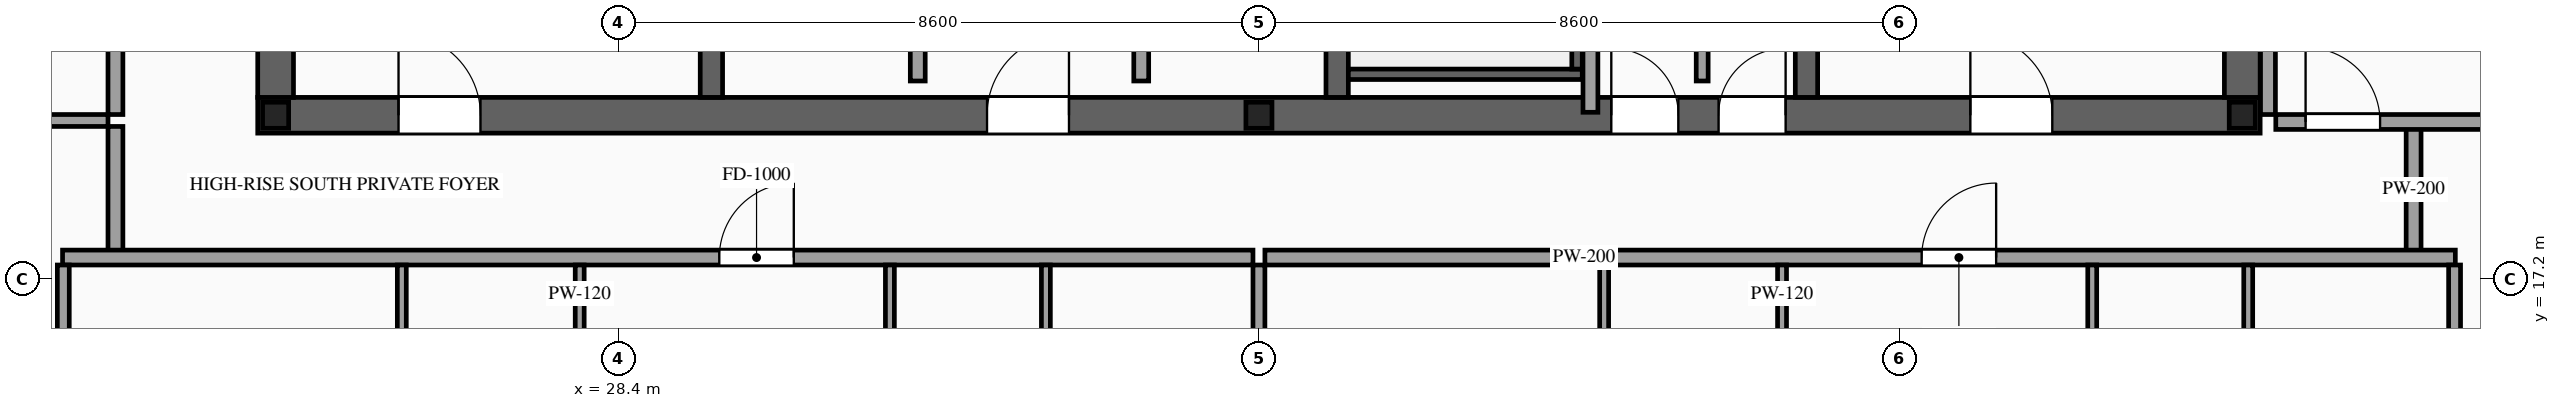
"""IFC4 building model, lengths in metres.
Left out: names, types, materials, properties, quantities, classifications, styles, units other than length and angle.
Written with IfcOpenShell. Run it as: python <this file> out.ifc"""

import sys

from ifc_helpers import new_model, si_unit, direction, frame, frame_2d, origin, origin_2d, place, context, subcontext, project, spatial, rectangle, i_section, extrude, source, transform, mapped, element, fill, save


model = new_model("IFC4")
c1 = context("Model", 3, precision=1e-05, world=origin(), true_north=direction((0.0, 1.0)))
c2 = subcontext(c1, "Body", "Model", "MODEL_VIEW")
j1 = project(units=[si_unit("LENGTHUNIT", "METRE"), si_unit("PLANEANGLEUNIT", "RADIAN")], contexts=[c1])
p1 = place(None, origin())
s1 = spatial("IfcSite", under=j1, at=p1, CompositionType="ELEMENT")
p2 = place(p1, origin())
s2 = spatial("IfcBuilding", under=s1, at=p2, CompositionType="ELEMENT")
p3 = place(p2, frame((0.0, 0.0, 321.7)))
s3 = spatial("IfcBuildingStorey", under=s2, at=p3, CompositionType="ELEMENT", Elevation=321.7)
p4 = place(p3, frame((23.56, 19.4, 0.0), z_axis=(0.0, 0.0, 1.0), x_axis=(1.0, 0.0, 0.0)))
e1 = element("IfcWall", 1, at=p4, inside=s3, PredefinedType="SHEAR", context=c2, shape_type="SweptSolid", body=[
    extrude(rectangle(XDim=26.88, YDim=0.48, at=frame_2d((13.44, 0.0))), origin(), (0.0, 0.0, 1.0), 3.5),
])
p5 = place(p4, frame((1.89, 0.0, 0.0)))
e2 = element("IfcOpeningElement", 2, at=p5, cuts=e1, PredefinedType="OPENING", context=c2, shape_type="SweptSolid", body=[
    extrude(rectangle(XDim=1.1, YDim=2.2, at=frame_2d((0.55, 1.1))), frame((0.0, 0.255, 0.0), z_axis=(0.0, -1.0, 0.0), x_axis=(1.0, 0.0, 0.0)), (0.0, 0.0, 1.0), 0.51),
])
p6 = place(p4, frame((9.79, 0.0, 0.0)))
e3 = element("IfcOpeningElement", 3, at=p6, cuts=e1, PredefinedType="OPENING", context=c2, shape_type="SweptSolid", body=[
    extrude(rectangle(XDim=1.1, YDim=2.2, at=frame_2d((0.55, 1.1))), frame((0.0, 0.255, 0.0), z_axis=(0.0, -1.0, 0.0), x_axis=(1.0, 0.0, 0.0)), (0.0, 0.0, 1.0), 0.51),
])
p7 = place(p4, frame((22.99, 0.0, 0.0)))
e4 = element("IfcOpeningElement", 4, at=p7, cuts=e1, PredefinedType="OPENING", context=c2, shape_type="SweptSolid", body=[
    extrude(rectangle(XDim=1.1, YDim=2.2, at=frame_2d((0.55, 1.1))), frame((0.0, 0.255, 0.0), z_axis=(0.0, -1.0, 0.0), x_axis=(1.0, 0.0, 0.0)), (0.0, 0.0, 1.0), 0.51),
])
p8 = place(p4, frame((19.61, 0.0, 0.0)))
e5 = element("IfcOpeningElement", 5, at=p8, cuts=e1, PredefinedType="OPENING", context=c2, shape_type="SweptSolid", body=[
    extrude(rectangle(XDim=0.9, YDim=2.15, at=frame_2d((0.45, 1.075))), frame((0.0, 0.255, 0.0), z_axis=(0.0, -1.0, 0.0), x_axis=(1.0, 0.0, 0.0)), (0.0, 0.0, 1.0), 0.51),
])
p9 = place(p4, frame((18.17, 0.0, 0.0)))
e6 = element("IfcOpeningElement", 6, at=p9, cuts=e1, PredefinedType="OPENING", context=c2, shape_type="SweptSolid", body=[
    extrude(rectangle(XDim=0.9, YDim=2.15, at=frame_2d((0.45, 1.075))), frame((0.0, 0.255, 0.0), z_axis=(0.0, -1.0, 0.0), x_axis=(1.0, 0.0, 0.0)), (0.0, 0.0, 1.0), 0.51),
])
m1 = source(origin(), c2, "Body", "SweptSolid", [
    extrude(rectangle(XDim=12.32, YDim=0.48, at=frame_2d((6.16, 0.0))), origin(), (0.0, 0.0, 1.0), 3.5),
])
for number, where, z_axis, x_axis in (
    (7, (23.8, 19.64, 0.0), (0.0, 0.0, 1.0), (0.0, 1.0, 0.0)),
    (8, (50.2, 19.64, 0.0), (0.0, 0.0, 1.0), (0.0, 1.0, 0.0)),
):
    element("IfcWall", number, at=place(p3, frame(where, z_axis=z_axis, x_axis=x_axis)), inside=s3, PredefinedType="SHEAR", context=c2, shape_type="MappedRepresentation", body=[
        mapped(m1, transform((0.0, 0.0, 0.0), scale=1.0)),
    ])
m2 = source(origin(), c2, "Body", "SweptSolid", [
    extrude(rectangle(XDim=12.32, YDim=0.3, at=frame_2d((6.16, 0.0))), origin(), (0.0, 0.0, 1.0), 3.5),
])
for number, where, z_axis, x_axis in (
    (9, (29.65, 19.64, 0.0), (0.0, 0.0, 1.0), (0.0, 1.0, 0.0)),
    (10, (38.05, 19.64, 0.0), (0.0, 0.0, 1.0), (0.0, 1.0, 0.0)),
):
    element("IfcWall", number, at=place(p3, frame(where, z_axis=z_axis, x_axis=x_axis)), inside=s3, PredefinedType="SOLIDWALL", context=c2, shape_type="MappedRepresentation", body=[
        mapped(m2, transform((0.0, 0.0, 0.0), scale=1.0)),
    ])
p10 = place(p3, frame((44.35, 19.64, 0.0), z_axis=(0.0, 0.0, 1.0), x_axis=(0.0, 1.0, 0.0)))
e11 = element("IfcWall", 11, at=p10, inside=s3, PredefinedType="SOLIDWALL", context=c2, shape_type="SweptSolid", body=[
    extrude(rectangle(XDim=12.32, YDim=0.3, at=frame_2d((6.16, 0.0))), origin(), (0.0, 0.0, 1.0), 3.5),
])
p11 = place(p10, frame((6.56, 0.0, 0.0)))
e12 = element("IfcOpeningElement", 12, at=p11, cuts=e11, PredefinedType="OPENING", context=c2, shape_type="SweptSolid", body=[
    extrude(rectangle(XDim=1.1, YDim=2.2, at=frame_2d((0.55, 1.1))), frame((0.0, 0.165, 0.0), z_axis=(0.0, -1.0, 0.0), x_axis=(1.0, 0.0, 0.0)), (0.0, 0.0, 1.0), 0.33),
])
p12 = place(p10, frame((8.66, 0.0, 0.0)))
e13 = element("IfcOpeningElement", 13, at=p12, cuts=e11, PredefinedType="OPENING", context=c2, shape_type="SweptSolid", body=[
    extrude(rectangle(XDim=1.1, YDim=2.2, at=frame_2d((0.55, 1.1))), frame((0.0, 0.165, 0.0), z_axis=(0.0, -1.0, 0.0), x_axis=(1.0, 0.0, 0.0)), (0.0, 0.0, 1.0), 0.33),
])
p13 = place(p10, frame((10.76, 0.0, 0.0)))
e14 = element("IfcOpeningElement", 14, at=p13, cuts=e11, PredefinedType="OPENING", context=c2, shape_type="SweptSolid", body=[
    extrude(rectangle(XDim=1.1, YDim=2.2, at=frame_2d((0.55, 1.1))), frame((0.0, 0.165, 0.0), z_axis=(0.0, -1.0, 0.0), x_axis=(1.0, 0.0, 0.0)), (0.0, 0.0, 1.0), 0.33),
])
m3 = source(origin(), c2, "Body", "SweptSolid", [
    extrude(i_section(OverallWidth=0.35, OverallDepth=0.35, WebThickness=0.012, FlangeThickness=0.019, at=origin_2d()), origin(), (0.0, 0.0, 1.0), 3.5),
])
for number, where, z_axis, x_axis in (
    (15, (23.8, 19.4, 0.0), (0.0, 0.0, 1.0), (1.0, 0.0, 0.0)),
    (16, (37.0, 19.4, 0.0), (0.0, 0.0, 1.0), (1.0, 0.0, 0.0)),
    (17, (50.2, 19.4, 0.0), (0.0, 0.0, 1.0), (1.0, 0.0, 0.0)),
):
    element("IfcColumn", number, at=place(p3, frame(where, z_axis=z_axis, x_axis=x_axis)), inside=s3, PredefinedType="COLUMN", context=c2, shape_type="MappedRepresentation", body=[
        mapped(m3, transform((0.0, 0.0, 0.0), scale=1.0)),
    ])
m4 = source(origin(), c2, "Body", "SweptSolid", [
    extrude(rectangle(XDim=3.14, YDim=0.14, at=frame_2d((1.57, 0.0))), origin(), (0.0, 0.0, 1.0), 3.28),
])
p14 = place(p3, frame((38.2, 19.95, 0.0), z_axis=(0.0, 0.0, 1.0), x_axis=(1.0, 0.0, 0.0)))
e18 = element("IfcWall", 18, at=p14, inside=s3, PredefinedType="SOLIDWALL", context=c2, shape_type="MappedRepresentation", body=[
    mapped(m4, transform((0.0, 0.0, 0.0), scale=1.0)),
])
m5 = source(origin(), c2, "Body", "SweptSolid", [
    extrude(rectangle(XDim=8.94, YDim=0.14, at=frame_2d((4.47, 0.0))), origin(), (0.0, 0.0, 1.0), 3.28),
])
p15 = place(p3, frame((41.27, 20.02, 0.0), z_axis=(0.0, 0.0, 1.0), x_axis=(0.0, 1.0, 0.0)))
e19 = element("IfcWall", 19, at=p15, inside=s3, PredefinedType="SOLIDWALL", context=c2, shape_type="MappedRepresentation", body=[
    mapped(m5, transform((0.0, 0.0, 0.0), scale=1.0)),
])
p16 = place(p3, frame((32.42, 19.86, 0.0), z_axis=(0.0, 0.0, 1.0), x_axis=(0.0, 1.0, 0.0)))
e20 = element("IfcWall", 20, at=p16, inside=s3, PredefinedType="PARTITIONING", context=c2, shape_type="SweptSolid", body=[
    extrude(rectangle(XDim=11.88, YDim=0.2, at=frame_2d((5.94, 0.0))), origin(), (0.0, 0.0, 1.0), 3.28),
])
p17 = place(p16, frame((5.49, 0.0, 0.0)))
e21 = element("IfcOpeningElement", 21, at=p17, cuts=e20, PredefinedType="OPENING", context=c2, shape_type="SweptSolid", body=[
    extrude(rectangle(XDim=0.9, YDim=2.15, at=frame_2d((0.45, 1.075))), frame((0.0, 0.115, 0.0), z_axis=(0.0, -1.0, 0.0), x_axis=(1.0, 0.0, 0.0)), (0.0, 0.0, 1.0), 0.23),
])
p18 = place(p3, frame((35.42, 19.86, 0.0), z_axis=(0.0, 0.0, 1.0), x_axis=(0.0, 1.0, 0.0)))
e22 = element("IfcWall", 22, at=p18, inside=s3, PredefinedType="PARTITIONING", context=c2, shape_type="SweptSolid", body=[
    extrude(rectangle(XDim=6.94, YDim=0.2, at=frame_2d((3.47, 0.0))), origin(), (0.0, 0.0, 1.0), 3.28),
])
p19 = place(p18, frame((3.02, 0.0, 0.0)))
e23 = element("IfcOpeningElement", 23, at=p19, cuts=e22, PredefinedType="OPENING", context=c2, shape_type="SweptSolid", body=[
    extrude(rectangle(XDim=0.9, YDim=2.15, at=frame_2d((0.45, 1.075))), frame((0.0, 0.115, 0.0), z_axis=(0.0, -1.0, 0.0), x_axis=(1.0, 0.0, 0.0)), (0.0, 0.0, 1.0), 0.23),
])
m6 = source(origin(), c2, "Body", "SweptSolid", [
    extrude(rectangle(XDim=1.34, YDim=0.16, at=frame_2d((0.67, 0.0))), origin(), (0.0, 0.0, 1.0), 3.28),
])
p20 = place(p3, frame((42.95, 19.86, 0.0), z_axis=(0.0, 0.0, 1.0), x_axis=(0.0, 1.0, 0.0)))
e24 = element("IfcWall", 24, at=p20, inside=s3, PredefinedType="PARTITIONING", context=c2, shape_type="MappedRepresentation", body=[
    mapped(m6, transform((0.0, 0.0, 0.0), scale=1.0)),
])
m7 = source(origin(), c2, "Body", "SweptSolid", [
    extrude(rectangle(XDim=6.06, YDim=0.2, at=frame_2d((3.03, 0.0))), origin(), (0.0, 0.0, 1.0), 3.28),
])
p21 = place(p3, frame((41.45, 19.44, 0.0), z_axis=(0.0, 0.0, 1.0), x_axis=(0.0, 1.0, 0.0)))
e25 = element("IfcWall", 25, at=p21, inside=s3, PredefinedType="PARTITIONING", context=c2, shape_type="MappedRepresentation", body=[
    mapped(m7, transform((0.0, 0.0, 0.0), scale=1.0)),
])
m8 = source(origin(), c2, "Body", "SweptSolid", [
    extrude(rectangle(XDim=1.7, YDim=0.2, at=frame_2d((0.85, 0.0))), origin(), (0.0, 0.0, 1.0), 3.28),
])
for number, where, z_axis, x_axis in (
    (26, (21.65, 17.55, 0.0), (0.0, 0.0, 1.0), (0.0, 1.0, 0.0)),
    (27, (52.5, 17.55, 0.0), (0.0, 0.0, 1.0), (0.0, 1.0, 0.0)),
):
    element("IfcWall", number, at=place(p3, frame(where, z_axis=z_axis, x_axis=x_axis)), inside=s3, PredefinedType="PARTITIONING", context=c2, shape_type="MappedRepresentation", body=[
        mapped(m8, transform((0.0, 0.0, 0.0), scale=1.0)),
    ])
p22 = place(p3, frame((20.94, 17.49, 0.0), z_axis=(0.0, 0.0, 1.0), x_axis=(1.0, 0.0, 0.0)))
e28 = element("IfcWall", 28, at=p22, inside=s3, PredefinedType="PARTITIONING", context=c2, shape_type="SweptSolid", body=[
    extrude(rectangle(XDim=15.98, YDim=0.2, at=frame_2d((7.99, 0.0))), origin(), (0.0, 0.0, 1.0), 3.28),
])
p23 = place(p22, frame((8.816, 0.0, 0.0)))
e29 = element("IfcOpeningElement", 29, at=p23, cuts=e28, PredefinedType="OPENING", context=c2, shape_type="SweptSolid", body=[
    extrude(rectangle(XDim=1.0, YDim=2.2, at=frame_2d((0.5, 1.1))), frame((0.0, 0.115, 0.0), z_axis=(0.0, -1.0, 0.0), x_axis=(1.0, 0.0, 0.0)), (0.0, 0.0, 1.0), 0.23),
])
m9 = source(origin(), c2, "Body", "SweptSolid", [
    extrude(rectangle(XDim=10.54, YDim=0.16, at=frame_2d((5.27, 0.0))), origin(), (0.0, 0.0, 1.0), 2.787),
])
p24 = place(p3, frame((37.0, 6.85, 0.0), z_axis=(0.0, 0.0, 1.0), x_axis=(0.0, 1.0, 0.0)))
e30 = element("IfcWall", 30, at=p24, inside=s3, PredefinedType="PARTITIONING", context=c2, shape_type="MappedRepresentation", body=[
    mapped(m9, transform((0.0, 0.0, 0.0), scale=1.0)),
])
m10 = source(origin(), c2, "Body", "SweptSolid", [
    extrude(rectangle(XDim=2.9, YDim=0.12, at=frame_2d((1.45, 0.0))), origin(), (0.0, 0.0, 1.0), 3.28),
])
p25 = place(p3, frame((25.494, 14.49, 0.0), z_axis=(0.0, 0.0, 1.0), x_axis=(0.0, 1.0, 0.0)))
e31 = element("IfcWall", 31, at=p25, inside=s3, PredefinedType="PARTITIONING", context=c2, shape_type="MappedRepresentation", body=[
    mapped(m10, transform((0.0, 0.0, 0.0), scale=1.0)),
])
p26 = place(p3, frame((27.882, 14.49, 0.0), z_axis=(0.0, 0.0, 1.0), x_axis=(0.0, 1.0, 0.0)))
e32 = element("IfcWall", 32, at=p26, inside=s3, PredefinedType="PARTITIONING", context=c2, shape_type="SweptSolid", body=[
    extrude(rectangle(XDim=2.9, YDim=0.12, at=frame_2d((1.45, 0.0))), origin(), (0.0, 0.0, 1.0), 3.28),
])
p27 = place(p26, frame((1.025, 0.0, 0.0)))
e33 = element("IfcOpeningElement", 33, at=p27, cuts=e32, PredefinedType="OPENING", context=c2, shape_type="SweptSolid", body=[
    extrude(rectangle(XDim=0.85, YDim=2.1, at=frame_2d((0.425, 1.05))), frame((0.0, 0.075, 0.0), z_axis=(0.0, -1.0, 0.0), x_axis=(1.0, 0.0, 0.0)), (0.0, 0.0, 1.0), 0.15),
])
for number, where, z_axis, x_axis in (
    (34, (34.14, 14.49, 0.0), (0.0, 0.0, 1.0), (0.0, 1.0, 0.0)),
    (35, (32.046, 14.49, 0.0), (0.0, 0.0, 1.0), (0.0, 1.0, 0.0)),
):
    element("IfcWall", number, at=place(p3, frame(where, z_axis=z_axis, x_axis=x_axis)), inside=s3, PredefinedType="PARTITIONING", context=c2, shape_type="MappedRepresentation", body=[
        mapped(m10, transform((0.0, 0.0, 0.0), scale=1.0)),
    ])
p28 = place(p3, frame((37.08, 17.49, 0.0), z_axis=(0.0, 0.0, 1.0), x_axis=(1.0, 0.0, 0.0)))
e36 = element("IfcWall", 36, at=p28, inside=s3, PredefinedType="PARTITIONING", context=c2, shape_type="SweptSolid", body=[
    extrude(rectangle(XDim=15.98, YDim=0.2, at=frame_2d((7.99, 0.0))), origin(), (0.0, 0.0, 1.0), 3.28),
])
p29 = place(p28, frame((8.816, 0.0, 0.0)))
e37 = element("IfcOpeningElement", 37, at=p29, cuts=e36, PredefinedType="OPENING", context=c2, shape_type="SweptSolid", body=[
    extrude(rectangle(XDim=1.0, YDim=2.2, at=frame_2d((0.5, 1.1))), frame((0.0, 0.115, 0.0), z_axis=(0.0, -1.0, 0.0), x_axis=(1.0, 0.0, 0.0)), (0.0, 0.0, 1.0), 0.23),
])
m11 = source(origin(), c2, "Body", "SweptSolid", [
    extrude(rectangle(XDim=10.39, YDim=0.16, at=frame_2d((5.195, 0.0))), origin(), (0.0, 0.0, 1.0), 3.28),
])
for number, where, z_axis, x_axis in (
    (38, (20.95, 7.0, 0.0), (0.0, 0.0, 1.0), (0.0, 1.0, 0.0)),
    (39, (53.05, 7.0, 0.0), (0.0, 0.0, 1.0), (0.0, 1.0, 0.0)),
):
    element("IfcWall", number, at=place(p3, frame(where, z_axis=z_axis, x_axis=x_axis)), inside=s3, PredefinedType="PARTITIONING", context=c2, shape_type="MappedRepresentation", body=[
        mapped(m11, transform((0.0, 0.0, 0.0), scale=1.0)),
    ])
p30 = place(p3, frame((41.634, 14.49, 0.0), z_axis=(0.0, 0.0, 1.0), x_axis=(0.0, 1.0, 0.0)))
e40 = element("IfcWall", 40, at=p30, inside=s3, PredefinedType="PARTITIONING", context=c2, shape_type="MappedRepresentation", body=[
    mapped(m10, transform((0.0, 0.0, 0.0), scale=1.0)),
])
p31 = place(p3, frame((44.022, 14.49, 0.0), z_axis=(0.0, 0.0, 1.0), x_axis=(0.0, 1.0, 0.0)))
e41 = element("IfcWall", 41, at=p31, inside=s3, PredefinedType="PARTITIONING", context=c2, shape_type="SweptSolid", body=[
    extrude(rectangle(XDim=2.9, YDim=0.12, at=frame_2d((1.45, 0.0))), origin(), (0.0, 0.0, 1.0), 3.28),
])
p32 = place(p31, frame((1.025, 0.0, 0.0)))
e42 = element("IfcOpeningElement", 42, at=p32, cuts=e41, PredefinedType="OPENING", context=c2, shape_type="SweptSolid", body=[
    extrude(rectangle(XDim=0.85, YDim=2.1, at=frame_2d((0.425, 1.05))), frame((0.0, 0.075, 0.0), z_axis=(0.0, -1.0, 0.0), x_axis=(1.0, 0.0, 0.0)), (0.0, 0.0, 1.0), 0.15),
])
m12 = source(origin(), c2, "Body", "SweptSolid", [
    extrude(rectangle(XDim=2.9, YDim=0.12, at=frame_2d((1.45, 0.0))), origin(), (0.0, 0.0, 1.0), 2.825),
])
p33 = place(p3, frame((50.28, 14.49, 0.0), z_axis=(0.0, 0.0, 1.0), x_axis=(0.0, 1.0, 0.0)))
e43 = element("IfcWall", 43, at=p33, inside=s3, PredefinedType="PARTITIONING", context=c2, shape_type="MappedRepresentation", body=[
    mapped(m12, transform((0.0, 0.0, 0.0), scale=1.0)),
])
p34 = place(p3, frame((48.186, 14.49, 0.0), z_axis=(0.0, 0.0, 1.0), x_axis=(0.0, 1.0, 0.0)))
e44 = element("IfcWall", 44, at=p34, inside=s3, PredefinedType="PARTITIONING", context=c2, shape_type="MappedRepresentation", body=[
    mapped(m10, transform((0.0, 0.0, 0.0), scale=1.0)),
])
p35 = place(p3, frame((21.65, 19.41, 0.0), z_axis=(0.0, 0.0, 1.0), x_axis=(0.0, 1.0, 0.0)))
e45 = element("IfcWall", 45, at=p35, inside=s3, PredefinedType="PARTITIONING", context=c2, shape_type="SweptSolid", body=[
    extrude(rectangle(XDim=12.78, YDim=0.2, at=frame_2d((6.39, 0.0))), origin(), (0.0, 0.0, 1.0), 3.28),
])
p36 = place(p35, frame((5.89, 0.0, 0.0)))
e46 = element("IfcOpeningElement", 46, at=p36, cuts=e45, PredefinedType="OPENING", context=c2, shape_type="SweptSolid", body=[
    extrude(rectangle(XDim=1.0, YDim=2.2, at=frame_2d((0.5, 1.1))), frame((0.0, 0.115, 0.0), z_axis=(0.0, -1.0, 0.0), x_axis=(1.0, 0.0, 0.0)), (0.0, 0.0, 1.0), 0.23),
])
m13 = source(origin(), c2, "Body", "SweptSolid", [
    extrude(rectangle(XDim=3.5, YDim=0.16, at=frame_2d((1.75, 0.0))), origin(), (0.0, 0.0, 1.0), 2.825),
])
p37 = place(p3, frame((18.05, 19.33, 0.0), z_axis=(0.0, 0.0, 1.0), x_axis=(1.0, 0.0, 0.0)))
e47 = element("IfcWall", 47, at=p37, inside=s3, PredefinedType="PARTITIONING", context=c2, shape_type="MappedRepresentation", body=[
    mapped(m13, transform((0.0, 0.0, 0.0), scale=1.0)),
])
p38 = place(p3, frame((50.65, 19.31, 0.0), z_axis=(0.0, 0.0, 1.0), x_axis=(1.0, 0.0, 0.0)))
e48 = element("IfcWall", 48, at=p38, inside=s3, PredefinedType="PARTITIONING", context=c2, shape_type="SweptSolid", body=[
    extrude(rectangle(XDim=5.3, YDim=0.2, at=frame_2d((2.65, 0.0))), origin(), (0.0, 0.0, 1.0), 2.825),
])
p39 = place(p38, frame((0.4, 0.0, 0.0)))
e49 = element("IfcOpeningElement", 49, at=p39, cuts=e48, PredefinedType="OPENING", context=c2, shape_type="SweptSolid", body=[
    extrude(rectangle(XDim=1.0, YDim=2.2, at=frame_2d((0.5, 1.1))), frame((0.0, 0.115, 0.0), z_axis=(0.0, -1.0, 0.0), x_axis=(1.0, 0.0, 0.0)), (0.0, 0.0, 1.0), 0.23),
])
m14 = source(origin(), c2, "Body", "SweptSolid", [
    extrude(rectangle(XDim=12.78, YDim=0.2, at=frame_2d((6.39, 0.0))), origin(), (0.0, 0.0, 1.0), 3.28),
])
p40 = place(p3, frame((50.545, 19.41, 0.0), z_axis=(0.0, 0.0, 1.0), x_axis=(0.0, 1.0, 0.0)))
e50 = element("IfcWall", 50, at=p40, inside=s3, PredefinedType="PARTITIONING", context=c2, shape_type="MappedRepresentation", body=[
    mapped(m14, transform((0.0, 0.0, 0.0), scale=1.0)),
])
m15 = source(origin(), c2, "Body", "SweptSolid", [
    extrude(rectangle(XDim=1.1, YDim=2.2, at=frame_2d((0.55, 1.1))), frame((0.0, 0.025, 0.0), z_axis=(0.0, -1.0, 0.0), x_axis=(1.0, 0.0, 0.0)), (0.0, 0.0, 1.0), 0.05),
])
p41 = place(p5, origin())
e51 = element("IfcDoor", 51, at=p41, inside=s3, OperationType="SINGLE_SWING_LEFT", PredefinedType="DOOR", context=c2, shape_type="MappedRepresentation", body=[
    mapped(m15, transform((0.0, 0.0, 0.0), scale=1.0)),
])
fill(e2, e51)
p42 = place(p6, origin())
e52 = element("IfcDoor", 52, at=p42, inside=s3, OperationType="SINGLE_SWING_RIGHT", PredefinedType="DOOR", context=c2, shape_type="MappedRepresentation", body=[
    mapped(m15, transform((0.0, 0.0, 0.0), scale=1.0)),
])
fill(e3, e52)
p43 = place(p7, origin())
e53 = element("IfcDoor", 53, at=p43, inside=s3, OperationType="SINGLE_SWING_LEFT", PredefinedType="DOOR", context=c2, shape_type="MappedRepresentation", body=[
    mapped(m15, transform((0.0, 0.0, 0.0), scale=1.0)),
])
fill(e4, e53)
m16 = source(origin(), c2, "Body", "SweptSolid", [
    extrude(rectangle(XDim=0.9, YDim=2.15, at=frame_2d((0.45, 1.075))), frame((0.0, 0.025, 0.0), z_axis=(0.0, -1.0, 0.0), x_axis=(1.0, 0.0, 0.0)), (0.0, 0.0, 1.0), 0.05),
])
p44 = place(p8, origin())
e54 = element("IfcDoor", 54, at=p44, inside=s3, OperationType="SINGLE_SWING_RIGHT", PredefinedType="DOOR", context=c2, shape_type="MappedRepresentation", body=[
    mapped(m16, transform((0.0, 0.0, 0.0), scale=1.0)),
])
fill(e5, e54)
p45 = place(p9, origin())
e55 = element("IfcDoor", 55, at=p45, inside=s3, OperationType="SINGLE_SWING_LEFT", PredefinedType="DOOR", context=c2, shape_type="MappedRepresentation", body=[
    mapped(m16, transform((0.0, 0.0, 0.0), scale=1.0)),
])
fill(e6, e55)
m17 = source(origin(), c2, "Body", "SweptSolid", [
    extrude(rectangle(XDim=1.0, YDim=2.2, at=frame_2d((0.5, 1.1))), frame((0.0, 0.025, 0.0), z_axis=(0.0, -1.0, 0.0), x_axis=(1.0, 0.0, 0.0)), (0.0, 0.0, 1.0), 0.05),
])
p46 = place(p23, origin())
e56 = element("IfcDoor", 56, at=p46, inside=s3, OperationType="SINGLE_SWING_RIGHT", PredefinedType="DOOR", context=c2, shape_type="MappedRepresentation", body=[
    mapped(m17, transform((0.0, 0.0, 0.0), scale=1.0)),
])
fill(e29, e56)
p47 = place(p29, origin())
e57 = element("IfcDoor", 57, at=p47, inside=s3, OperationType="SINGLE_SWING_RIGHT", PredefinedType="DOOR", context=c2, shape_type="MappedRepresentation", body=[
    mapped(m17, transform((0.0, 0.0, 0.0), scale=1.0)),
])
fill(e37, e57)
p48 = place(p39, origin())
e58 = element("IfcDoor", 58, at=p48, inside=s3, OperationType="SINGLE_SWING_LEFT", PredefinedType="DOOR", context=c2, shape_type="MappedRepresentation", body=[
    mapped(m17, transform((0.0, 0.0, 0.0), scale=1.0)),
])
fill(e49, e58)
save(model, sys.argv[1])
